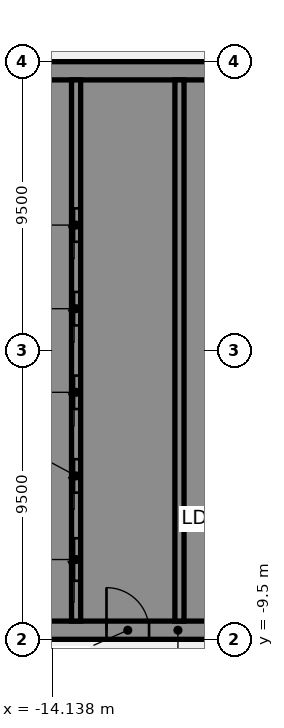
"""IFC4 building model, lengths in metres.
Left out: names, types, materials, properties, quantities, classifications, styles, units other than length and angle.
Written with IfcOpenShell. Run it as: python <this file> out.ifc"""

import sys

from ifc_helpers import new_model, si_unit, direction, frame, frame_2d, origin, place, context, subcontext, project, spatial, polyline, rectangle, outline, extrude, element, fill, save


model = new_model("IFC4")
c1 = context("Model", 3, precision=1e-05, world=origin(), true_north=direction((0.0, 1.0)))
c2 = subcontext(c1, "Body", "Model", "MODEL_VIEW")
j1 = project(units=[si_unit("LENGTHUNIT", "METRE"), si_unit("PLANEANGLEUNIT", "RADIAN")], contexts=[c1])
p1 = place(None, origin())
s1 = spatial("IfcSite", under=j1, at=p1, CompositionType="ELEMENT")
p2 = place(p1, origin())
s2 = spatial("IfcBuilding", under=s1, at=p2, CompositionType="ELEMENT")
p3 = place(p2, frame((0.0, 0.0, 98.5)))
s3 = spatial("IfcBuildingStorey", under=s2, at=p3, CompositionType="ELEMENT", Elevation=98.5)
p4 = place(p3, frame((-16.5, -9.2, 0.0), z_axis=(0.0, 0.0, 1.0), x_axis=(1.0, 0.0, 0.0)))
e1 = element("IfcWall", 1, at=p4, inside=s3, PredefinedType="SHEAR", context=c2, shape_type="SweptSolid", body=[
    extrude(rectangle(XDim=13.0, YDim=0.6, at=frame_2d((6.5, 0.0))), origin(), (0.0, 0.0, 1.0), 3.61),
])
p5 = place(p4, frame((4.15, 0.0, 0.0)))
e2 = element("IfcOpeningElement", 2, at=p5, cuts=e1, PredefinedType="OPENING", context=c2, shape_type="SweptSolid", body=[
    extrude(rectangle(XDim=1.4, YDim=2.1, at=frame_2d((0.7, 1.05))), frame((0.0, 0.31, 0.0), z_axis=(0.0, -1.0, 0.0), x_axis=(1.0, 0.0, 0.0)), (0.0, 0.0, 1.0), 0.62),
])
p6 = place(p4, frame((10.125, 0.0, 0.0)))
e3 = element("IfcOpeningElement", 3, at=p6, cuts=e1, PredefinedType="OPENING", context=c2, shape_type="SweptSolid", body=[
    extrude(rectangle(XDim=1.4, YDim=2.1, at=frame_2d((0.7, 1.05))), frame((0.0, 0.31, 0.0), z_axis=(0.0, -1.0, 0.0), x_axis=(1.0, 0.0, 0.0)), (0.0, 0.0, 1.0), 0.62),
])
p7 = place(p3, origin())
e4 = element("IfcWall", 4, at=p7, inside=s3, PredefinedType="SHEAR", context=c2, shape_type="SweptSolid", body=[
    extrude(outline(polyline([(-13.5, -8.9), (-13.5, -8.125), (-15.9, -8.125), (-15.9, -5.625), (-13.5, -5.625), (-13.5, -5.375), (-15.9, -5.375), (-15.9, -2.875), (-13.5, -2.875), (-13.5, -2.625), (-15.9, -2.625), (-15.9, -0.125), (-13.5, -0.125), (-13.5, 0.125), (-15.9, 0.125), (-15.9, 2.625), (-13.5, 2.625), (-13.5, 2.875), (-15.9, 2.875), (-15.9, 5.375), (-13.5, 5.375), (-13.5, 5.625), (-15.9, 5.625), (-15.9, 8.125), (-13.5, 8.125), (-13.5, 8.9), (-15.9, 8.9), (-16.5, 8.9), (-16.5, -8.9), (-15.9, -8.9), (-13.5, -8.9)])), origin(), (0.0, 0.0, 1.0), 3.61),
])
p8 = place(p3, frame((-16.5, 9.2, 0.0), z_axis=(0.0, 0.0, 1.0), x_axis=(1.0, 0.0, 0.0)))
e5 = element("IfcWall", 5, at=p8, inside=s3, PredefinedType="SHEAR", context=c2, shape_type="SweptSolid", body=[
    extrude(rectangle(XDim=13.0, YDim=0.6, at=frame_2d((6.5, 0.0))), origin(), (0.0, 0.0, 1.0), 3.61),
])
p9 = place(p3, origin())
e6 = element("IfcWall", 6, at=p9, inside=s3, PredefinedType="SHEAR", context=c2, shape_type="SweptSolid", body=[
    extrude(outline(polyline([(-9.8, -5.375), (-9.8, -5.625), (-7.5, -5.625), (-7.2, -5.625), (-7.2, 8.9), (-7.5, 8.9), (-9.8, 8.9), (-9.8, 8.125), (-7.5, 8.125), (-7.5, 5.625), (-9.8, 5.625), (-9.8, 5.375), (-7.5, 5.375), (-7.5, 2.875), (-9.8, 2.875), (-9.8, 2.625), (-7.5, 2.625), (-7.5, 0.125), (-9.8, 0.125), (-9.8, -0.125), (-7.5, -0.125), (-7.5, -2.625), (-9.8, -2.625), (-9.8, -2.875), (-7.5, -2.875), (-7.5, -5.375), (-9.8, -5.375)])), origin(), (0.0, 0.0, 1.0), 3.61),
])
p10 = place(p3, origin())
e7 = element("IfcWall", 7, at=p10, inside=s3, PredefinedType="SHEAR", context=c2, shape_type="SweptSolid", body=[
    extrude(outline(polyline([(-7.5, -8.125), (-9.55, -8.125), (-9.55, -5.625), (-9.8, -5.625), (-9.8, -8.125), (-9.8, -8.9), (-7.5, -8.9), (-7.5, -8.125)])), origin(), (0.0, 0.0, 1.0), 3.61),
])
p11 = place(p3, frame((-13.35, -8.9, 0.0), z_axis=(0.0, 0.0, 1.0), x_axis=(0.0, 1.0, 0.0)))
e8 = element("IfcWall", 8, at=p11, inside=s3, PredefinedType="SHEAR", context=c2, shape_type="SweptSolid", body=[
    extrude(rectangle(XDim=17.8, YDim=0.3, at=frame_2d((8.9, 0.0))), origin(), (0.0, 0.0, 1.0), 3.61),
])
p12 = place(p11, frame((1.325, 0.0, 0.0)))
e9 = element("IfcOpeningElement", 9, at=p12, cuts=e8, PredefinedType="OPENING", context=c2, shape_type="SweptSolid", body=[
    extrude(rectangle(XDim=1.4, YDim=2.1, at=frame_2d((0.7, 1.05))), frame((0.0, 0.16, 0.0), z_axis=(0.0, -1.0, 0.0), x_axis=(1.0, 0.0, 0.0)), (0.0, 0.0, 1.0), 0.32),
])
p13 = place(p11, frame((4.225, 0.0, 0.0)))
e10 = element("IfcOpeningElement", 10, at=p13, cuts=e8, PredefinedType="OPENING", context=c2, shape_type="SweptSolid", body=[
    extrude(rectangle(XDim=1.1, YDim=2.1, at=frame_2d((0.55, 1.05))), frame((0.0, 0.16, 0.0), z_axis=(0.0, -1.0, 0.0), x_axis=(1.0, 0.0, 0.0)), (0.0, 0.0, 1.0), 0.32),
])
p14 = place(p11, frame((6.975, 0.0, 0.0)))
e11 = element("IfcOpeningElement", 11, at=p14, cuts=e8, PredefinedType="OPENING", context=c2, shape_type="SweptSolid", body=[
    extrude(rectangle(XDim=1.1, YDim=2.1, at=frame_2d((0.55, 1.05))), frame((0.0, 0.16, 0.0), z_axis=(0.0, -1.0, 0.0), x_axis=(1.0, 0.0, 0.0)), (0.0, 0.0, 1.0), 0.32),
])
p15 = place(p11, frame((9.725, 0.0, 0.0)))
e12 = element("IfcOpeningElement", 12, at=p15, cuts=e8, PredefinedType="OPENING", context=c2, shape_type="SweptSolid", body=[
    extrude(rectangle(XDim=1.1, YDim=2.1, at=frame_2d((0.55, 1.05))), frame((0.0, 0.16, 0.0), z_axis=(0.0, -1.0, 0.0), x_axis=(1.0, 0.0, 0.0)), (0.0, 0.0, 1.0), 0.32),
])
p16 = place(p11, frame((12.475, 0.0, 0.0)))
e13 = element("IfcOpeningElement", 13, at=p16, cuts=e8, PredefinedType="OPENING", context=c2, shape_type="SweptSolid", body=[
    extrude(rectangle(XDim=1.1, YDim=2.1, at=frame_2d((0.55, 1.05))), frame((0.0, 0.16, 0.0), z_axis=(0.0, -1.0, 0.0), x_axis=(1.0, 0.0, 0.0)), (0.0, 0.0, 1.0), 0.32),
])
p17 = place(p3, frame((-9.95, -8.9, 0.0), z_axis=(0.0, 0.0, 1.0), x_axis=(0.0, 1.0, 0.0)))
e14 = element("IfcWall", 14, at=p17, inside=s3, PredefinedType="SHEAR", context=c2, shape_type="SweptSolid", body=[
    extrude(rectangle(XDim=17.8, YDim=0.3, at=frame_2d((8.9, 0.0))), origin(), (0.0, 0.0, 1.0), 3.61),
])
p18 = place(p5, origin())
e15 = element("IfcDoor", 15, at=p18, inside=s3, OperationType="SINGLE_SWING_LEFT", PredefinedType="DOOR", context=c2, shape_type="SweptSolid", body=[
    extrude(rectangle(XDim=1.4, YDim=2.1, at=frame_2d((0.7, 1.05))), frame((0.0, 0.025, 0.0), z_axis=(0.0, -1.0, 0.0), x_axis=(1.0, 0.0, 0.0)), (0.0, 0.0, 1.0), 0.05),
])
fill(e2, e15)
p19 = place(p12, origin())
e16 = element("IfcDoor", 16, at=p19, inside=s3, OperationType="SLIDING_TO_LEFT", PredefinedType="DOOR", context=c2, shape_type="SweptSolid", body=[
    extrude(rectangle(XDim=1.4, YDim=2.1, at=frame_2d((0.7, 1.05))), frame((0.0, 0.025, 0.0), z_axis=(0.0, -1.0, 0.0), x_axis=(1.0, 0.0, 0.0)), (0.0, 0.0, 1.0), 0.05),
])
fill(e9, e16)
p20 = place(p13, origin())
e17 = element("IfcDoor", 17, at=p20, inside=s3, OperationType="SLIDING_TO_LEFT", PredefinedType="DOOR", context=c2, shape_type="SweptSolid", body=[
    extrude(rectangle(XDim=1.1, YDim=2.1, at=frame_2d((0.55, 1.05))), frame((0.0, 0.025, 0.0), z_axis=(0.0, -1.0, 0.0), x_axis=(1.0, 0.0, 0.0)), (0.0, 0.0, 1.0), 0.05),
])
fill(e10, e17)
p21 = place(p14, origin())
e18 = element("IfcDoor", 18, at=p21, inside=s3, OperationType="SLIDING_TO_LEFT", PredefinedType="DOOR", context=c2, shape_type="SweptSolid", body=[
    extrude(rectangle(XDim=1.1, YDim=2.1, at=frame_2d((0.55, 1.05))), frame((0.0, 0.025, 0.0), z_axis=(0.0, -1.0, 0.0), x_axis=(1.0, 0.0, 0.0)), (0.0, 0.0, 1.0), 0.05),
])
fill(e11, e18)
p22 = place(p15, origin())
e19 = element("IfcDoor", 19, at=p22, inside=s3, OperationType="SLIDING_TO_LEFT", PredefinedType="DOOR", context=c2, shape_type="SweptSolid", body=[
    extrude(rectangle(XDim=1.1, YDim=2.1, at=frame_2d((0.55, 1.05))), frame((0.0, 0.025, 0.0), z_axis=(0.0, -1.0, 0.0), x_axis=(1.0, 0.0, 0.0)), (0.0, 0.0, 1.0), 0.05),
])
fill(e12, e19)
p23 = place(p16, origin())
e20 = element("IfcDoor", 20, at=p23, inside=s3, OperationType="SLIDING_TO_LEFT", PredefinedType="DOOR", context=c2, shape_type="SweptSolid", body=[
    extrude(rectangle(XDim=1.1, YDim=2.1, at=frame_2d((0.55, 1.05))), frame((0.0, 0.025, 0.0), z_axis=(0.0, -1.0, 0.0), x_axis=(1.0, 0.0, 0.0)), (0.0, 0.0, 1.0), 0.05),
])
fill(e13, e20)
save(model, sys.argv[1])
